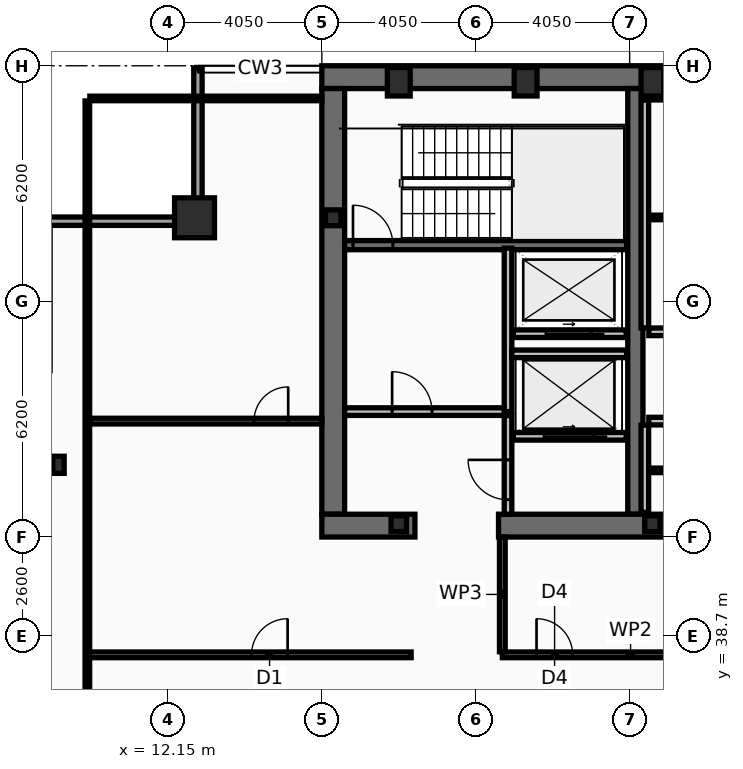
"""IFC4 building model, lengths in metres.
Left out: names, types, materials, properties, quantities, classifications, styles, units other than length and angle.
Written with IfcOpenShell. Run it as: python <this file> out.ifc"""

import sys

from ifc_helpers import new_model, si_unit, direction, frame, frame_2d, origin, origin_2d, place, context, subcontext, project, spatial, rectangle, hollow_rectangle, i_section, extrude, element, fill, save


model = new_model("IFC4")
c1 = context("Model", 3, precision=1e-05, world=origin(), true_north=direction((0.0, 1.0)))
c2 = subcontext(c1, "Body", "Model", "MODEL_VIEW")
j1 = project(units=[si_unit("LENGTHUNIT", "METRE"), si_unit("PLANEANGLEUNIT", "RADIAN")], contexts=[c1])
p1 = place(None, origin())
s1 = spatial("IfcSite", under=j1, at=p1, CompositionType="ELEMENT")
p2 = place(p1, origin())
s2 = spatial("IfcBuilding", under=s1, at=p2, CompositionType="ELEMENT")
p3 = place(p2, frame((0.0, 0.0, 242.6)))
s3 = spatial("IfcBuildingStorey", under=s2, at=p3, CompositionType="ELEMENT", Elevation=242.6)
p4 = place(p3, frame((16.2, 53.4, 0.0), z_axis=(0.0, 0.0, 1.0), x_axis=(1.0, 0.0, 0.0)))
e1 = element("IfcWall", 1, at=p4, inside=s3, PredefinedType="SHEAR", context=c2, shape_type="SweptSolid", body=[
    extrude(rectangle(XDim=40.5, YDim=0.6, at=frame_2d((20.25, 0.0))), origin(), (0.0, 0.0, 1.0), 3.44),
])
p5 = place(p3, frame((16.5, 41.9, 0.0), z_axis=(0.0, 0.0, 1.0), x_axis=(0.0, 1.0, 0.0)))
e2 = element("IfcWall", 2, at=p5, inside=s3, PredefinedType="SHEAR", context=c2, shape_type="SweptSolid", body=[
    extrude(rectangle(XDim=11.2, YDim=0.6, at=frame_2d((5.6, 0.0))), origin(), (0.0, 0.0, 1.0), 3.44),
])
p6 = place(p3, frame((24.45, 41.9, 0.0), z_axis=(0.0, 0.0, 1.0), x_axis=(0.0, 1.0, 0.0)))
e3 = element("IfcWall", 3, at=p6, inside=s3, PredefinedType="SHEAR", context=c2, shape_type="SweptSolid", body=[
    extrude(rectangle(XDim=11.2, YDim=0.4, at=frame_2d((5.6, 0.0))), origin(), (0.0, 0.0, 1.0), 3.44),
])
p7 = place(p3, frame((18.65, 41.6, 0.0), z_axis=(0.0, 0.0, 1.0), x_axis=(-1.0, 0.0, 0.0)))
e4 = element("IfcWall", 4, at=p7, inside=s3, PredefinedType="SHEAR", context=c2, shape_type="SweptSolid", body=[
    extrude(rectangle(XDim=2.45, YDim=0.6, at=frame_2d((1.225, 0.0))), origin(), (0.0, 0.0, 1.0), 3.44),
])
p8 = place(p3, frame((32.3, 41.6, 0.0), z_axis=(0.0, 0.0, 1.0), x_axis=(-1.0, 0.0, 0.0)))
e5 = element("IfcWall", 5, at=p8, inside=s3, PredefinedType="SHEAR", context=c2, shape_type="SweptSolid", body=[
    extrude(rectangle(XDim=11.45, YDim=0.6, at=frame_2d((5.725, 0.0))), origin(), (0.0, 0.0, 1.0), 3.44),
])
p9 = place(p3, frame((16.8, 48.98, 0.0), z_axis=(0.0, 0.0, 1.0), x_axis=(1.0, 0.0, 0.0)))
e6 = element("IfcWall", 6, at=p9, inside=s3, PredefinedType="SHEAR", context=c2, shape_type="SweptSolid", body=[
    extrude(rectangle(XDim=7.42, YDim=0.24, at=frame_2d((3.71, 0.0))), origin(), (0.0, 0.0, 1.0), 3.44),
])
p10 = place(p9, frame((0.22, 0.0, 0.0)))
e7 = element("IfcOpeningElement", 7, at=p10, cuts=e6, PredefinedType="OPENING", context=c2, shape_type="SweptSolid", body=[
    extrude(rectangle(XDim=1.05, YDim=2.15, at=frame_2d((0.525, 1.075))), frame((0.0, 0.13, 0.0), z_axis=(0.0, -1.0, 0.0), x_axis=(1.0, 0.0, 0.0)), (0.0, 0.0, 1.0), 0.26),
])
p11 = place(p3, frame((12.85, 49.7, 0.0), z_axis=(0.0, 0.0, 1.0), x_axis=(1.0, 0.0, 0.0)))
e8 = element("IfcColumn", 8, at=p11, inside=s3, PredefinedType="COLUMN", context=c2, shape_type="SweptSolid", body=[
    extrude(hollow_rectangle(XDim=1.05, YDim=1.05, WallThickness=0.055, at=origin_2d()), origin(), (0.0, 0.0, 1.0), 3.6),
])
for number, where, z_axis, x_axis in (
    (9, (18.225, 53.28, 0.0), (0.0, 0.0, 1.0), (1.0, 0.0, 0.0)),
    (10, (21.562, 53.28, 0.0), (0.0, 0.0, 1.0), (1.0, 0.0, 0.0)),
    (11, (24.9, 53.28, 0.0), (0.0, 0.0, 1.0), (1.0, 0.0, 0.0)),
):
    element("IfcColumn", number, at=place(p3, frame(where, z_axis=z_axis, x_axis=x_axis)), inside=s3, PredefinedType="COLUMN", context=c2, shape_type="SweptSolid", body=[
        extrude(hollow_rectangle(XDim=0.6, YDim=0.75, WallThickness=0.045, at=origin_2d()), origin(), (0.0, 0.0, 1.0), 3.6),
    ])
p12 = place(p3, frame((9.27, 43.2, 0.0), z_axis=(0.0, 0.0, 1.0), x_axis=(1.0, 0.0, 0.0)))
e12 = element("IfcColumn", 12, at=p12, inside=s3, PredefinedType="COLUMN", context=c2, shape_type="SweptSolid", body=[
    extrude(i_section(OverallWidth=0.3, OverallDepth=0.45, WebThickness=0.014, FlangeThickness=0.026, at=origin_2d()), origin(), (0.0, 0.0, 1.0), 3.6),
])
for number, where, z_axis, x_axis in (
    (13, (16.5, 49.7, 0.0), (0.0, 0.0, 1.0), (1.0, 0.0, 0.0)),
    (14, (18.225, 41.65, 0.0), (0.0, 0.0, 1.0), (1.0, 0.0, 0.0)),
    (15, (24.9, 41.65, 0.0), (0.0, 0.0, 1.0), (1.0, 0.0, 0.0)),
):
    element("IfcColumn", number, at=place(p3, frame(where, z_axis=z_axis, x_axis=x_axis)), inside=s3, PredefinedType="COLUMN", context=c2, shape_type="SweptSolid", body=[
        extrude(i_section(OverallWidth=0.406, OverallDepth=0.416, WebThickness=0.03, FlangeThickness=0.048, at=origin_2d()), origin(), (0.0, 0.0, 1.0), 3.6),
    ])
p13 = place(p3, frame((8.83, 49.61, 0.0), z_axis=(0.0, 0.0, 1.0), x_axis=(1.0, 0.0, 0.0)))
e16 = element("IfcWall", 16, at=p13, inside=s3, PredefinedType="SOLIDWALL", context=c2, shape_type="SweptSolid", body=[
    extrude(rectangle(XDim=4.22, YDim=0.22, at=frame_2d((2.11, 0.0))), origin(), (0.0, 0.0, 1.0), 2.83),
])
p14 = place(p3, frame((12.94, 49.72, 0.0), z_axis=(0.0, 0.0, 1.0), x_axis=(0.0, 1.0, 0.0)))
e17 = element("IfcWall", 17, at=p14, inside=s3, PredefinedType="SOLIDWALL", context=c2, shape_type="SweptSolid", body=[
    extrude(rectangle(XDim=3.91, YDim=0.22, at=frame_2d((1.955, 0.0))), origin(), (0.0, 0.0, 1.0), 2.83),
])
p15 = place(p3, frame((24.21, 43.95, 0.0), z_axis=(0.0, 0.0, 1.0), x_axis=(-1.0, 0.0, 0.0)))
e18 = element("IfcWall", 18, at=p15, inside=s3, PredefinedType="PARTITIONING", context=c2, shape_type="SweptSolid", body=[
    extrude(rectangle(XDim=2.97, YDim=0.2, at=frame_2d((1.485, 0.0))), origin(), (0.0, 0.0, 1.0), 3.44),
])
p16 = place(p15, frame((0.86, 0.0, 0.0)))
e19 = element("IfcOpeningElement", 19, at=p16, cuts=e18, PredefinedType="OPENING", context=c2, shape_type="SweptSolid", body=[
    extrude(rectangle(XDim=1.3, YDim=2.18, at=frame_2d((0.65, 1.09))), frame((0.0, 0.11, 0.0), z_axis=(0.0, -1.0, 0.0), x_axis=(1.0, 0.0, 0.0)), (0.0, 0.0, 1.0), 0.22),
])
p17 = place(p3, frame((24.21, 46.65, 0.0), z_axis=(0.0, 0.0, 1.0), x_axis=(-1.0, 0.0, 0.0)))
e20 = element("IfcWall", 20, at=p17, inside=s3, PredefinedType="PARTITIONING", context=c2, shape_type="SweptSolid", body=[
    extrude(rectangle(XDim=2.97, YDim=0.2, at=frame_2d((1.485, 0.0))), origin(), (0.0, 0.0, 1.0), 3.44),
])
p18 = place(p17, frame((0.91, 0.0, 0.0)))
e21 = element("IfcOpeningElement", 21, at=p18, cuts=e20, PredefinedType="OPENING", context=c2, shape_type="SweptSolid", body=[
    extrude(rectangle(XDim=1.2, YDim=2.18, at=frame_2d((0.6, 1.09))), frame((0.0, 0.11, 0.0), z_axis=(0.0, -1.0, 0.0), x_axis=(1.0, 0.0, 0.0)), (0.0, 0.0, 1.0), 0.22),
])
p19 = place(p3, frame((21.1, 44.6, 0.0), z_axis=(0.0, 0.0, 1.0), x_axis=(0.0, 1.0, 0.0)))
e22 = element("IfcWall", 22, at=p19, inside=s3, PredefinedType="PARTITIONING", context=c2, shape_type="SweptSolid", body=[
    extrude(rectangle(XDim=4.3, YDim=0.2, at=frame_2d((2.15, 0.0))), origin(), (0.0, 0.0, 1.0), 3.44),
])
p20 = place(p3, frame((16.8, 44.6, 0.0), z_axis=(0.0, 0.0, 1.0), x_axis=(1.0, 0.0, 0.0)))
e23 = element("IfcWall", 23, at=p20, inside=s3, PredefinedType="PARTITIONING", context=c2, shape_type="SweptSolid", body=[
    extrude(rectangle(XDim=4.2, YDim=0.2, at=frame_2d((2.1, 0.0))), origin(), (0.0, 0.0, 1.0), 3.44),
])
p21 = place(p20, frame((1.25, 0.0, 0.0)))
e24 = element("IfcOpeningElement", 24, at=p21, cuts=e23, PredefinedType="OPENING", context=c2, shape_type="SweptSolid", body=[
    extrude(rectangle(XDim=1.05, YDim=2.15, at=frame_2d((0.525, 1.075))), frame((0.0, 0.11, 0.0), z_axis=(0.0, -1.0, 0.0), x_axis=(1.0, 0.0, 0.0)), (0.0, 0.0, 1.0), 0.22),
])
p22 = place(p3, frame((21.2, 46.12, 0.0), z_axis=(0.0, 0.0, 1.0), x_axis=(1.0, 0.0, 0.0)))
e25 = element("IfcWall", 25, at=p22, inside=s3, PredefinedType="PARTITIONING", context=c2, shape_type="SweptSolid", body=[
    extrude(rectangle(XDim=3.02, YDim=0.2, at=frame_2d((1.51, 0.0))), origin(), (0.0, 0.0, 1.0), 3.44),
])
p23 = place(p3, frame((21.1, 41.9, 0.0), z_axis=(0.0, 0.0, 1.0), x_axis=(0.0, 1.0, 0.0)))
e26 = element("IfcWall", 26, at=p23, inside=s3, PredefinedType="PARTITIONING", context=c2, shape_type="SweptSolid", body=[
    extrude(rectangle(XDim=2.595, YDim=0.2, at=frame_2d((1.298, 0.0))), origin(), (0.0, 0.0, 1.0), 3.44),
])
p24 = place(p23, frame((0.38, 0.0, 0.0)))
e27 = element("IfcOpeningElement", 27, at=p24, cuts=e26, PredefinedType="OPENING", context=c2, shape_type="SweptSolid", body=[
    extrude(rectangle(XDim=1.05, YDim=2.15, at=frame_2d((0.525, 1.075))), frame((0.0, 0.11, 0.0), z_axis=(0.0, -1.0, 0.0), x_axis=(1.0, 0.0, 0.0)), (0.0, 0.0, 1.0), 0.22),
])
p25 = place(p3, frame((24.7, 46.805, 0.0), z_axis=(0.0, 0.0, 1.0), x_axis=(0.0, 1.0, 0.0)))
e28 = element("IfcWall", 28, at=p25, inside=s3, PredefinedType="PARTITIONING", context=c2, shape_type="SweptSolid", body=[
    extrude(rectangle(XDim=5.99, YDim=0.2, at=frame_2d((2.995, 0.0))), origin(), (0.0, 0.0, 1.0), 3.44),
])
p26 = place(p3, frame((24.805, 52.86, 0.0), z_axis=(0.0, 0.0, 1.0), x_axis=(1.0, 0.0, 0.0)))
e29 = element("IfcWall", 29, at=p26, inside=s3, PredefinedType="PARTITIONING", context=c2, shape_type="SweptSolid", body=[
    extrude(rectangle(XDim=7.51, YDim=0.12, at=frame_2d((3.755, 0.0))), origin(), (0.0, 0.0, 1.0), 3.44),
])
p27 = place(p3, frame((24.805, 49.709, 0.0), z_axis=(0.0, 0.0, 1.0), x_axis=(1.0, 0.0, 0.0)))
e30 = element("IfcWall", 30, at=p27, inside=s3, PredefinedType="PARTITIONING", context=c2, shape_type="SweptSolid", body=[
    extrude(rectangle(XDim=7.51, YDim=0.12, at=frame_2d((3.755, 0.0))), origin(), (0.0, 0.0, 1.0), 3.44),
])
p28 = place(p27, frame((2.4, 0.0, 0.0)))
e31 = element("IfcOpeningElement", 31, at=p28, cuts=e30, PredefinedType="OPENING", context=c2, shape_type="SweptSolid", body=[
    extrude(rectangle(XDim=0.9, YDim=2.05, at=frame_2d((0.45, 1.025))), frame((0.0, 0.07, 0.0), z_axis=(0.0, -1.0, 0.0), x_axis=(1.0, 0.0, 0.0)), (0.0, 0.0, 1.0), 0.14),
])
p29 = place(p3, frame((24.805, 46.7, 0.0), z_axis=(0.0, 0.0, 1.0), x_axis=(1.0, 0.0, 0.0)))
e32 = element("IfcWall", 32, at=p29, inside=s3, PredefinedType="PARTITIONING", context=c2, shape_type="SweptSolid", body=[
    extrude(rectangle(XDim=7.51, YDim=0.2, at=frame_2d((3.755, 0.0))), origin(), (0.0, 0.0, 1.0), 3.44),
])
p30 = place(p29, frame((2.4, 0.0, 0.0)))
e33 = element("IfcOpeningElement", 33, at=p30, cuts=e32, PredefinedType="OPENING", context=c2, shape_type="SweptSolid", body=[
    extrude(rectangle(XDim=0.95, YDim=2.1, at=frame_2d((0.475, 1.05))), frame((0.0, 0.11, 0.0), z_axis=(0.0, -1.0, 0.0), x_axis=(1.0, 0.0, 0.0)), (0.0, 0.0, 1.0), 0.22),
])
p31 = place(p3, frame((24.7, 41.95, 0.0), z_axis=(0.0, 0.0, 1.0), x_axis=(0.0, 1.0, 0.0)))
e34 = element("IfcWall", 34, at=p31, inside=s3, PredefinedType="PARTITIONING", context=c2, shape_type="SweptSolid", body=[
    extrude(rectangle(XDim=2.295, YDim=0.2, at=frame_2d((1.147, 0.0))), origin(), (0.0, 0.0, 1.0), 3.44),
])
p32 = place(p3, frame((24.805, 43.054, 0.0), z_axis=(0.0, 0.0, 1.0), x_axis=(1.0, 0.0, 0.0)))
e35 = element("IfcWall", 35, at=p32, inside=s3, PredefinedType="PARTITIONING", context=c2, shape_type="SweptSolid", body=[
    extrude(rectangle(XDim=7.34, YDim=0.12, at=frame_2d((3.67, 0.0))), origin(), (0.0, 0.0, 1.0), 3.44),
])
p33 = place(p32, frame((2.4, 0.0, 0.0)))
e36 = element("IfcOpeningElement", 36, at=p33, cuts=e35, PredefinedType="OPENING", context=c2, shape_type="SweptSolid", body=[
    extrude(rectangle(XDim=0.9, YDim=2.05, at=frame_2d((0.45, 1.025))), frame((0.0, 0.07, 0.0), z_axis=(0.0, -1.0, 0.0), x_axis=(1.0, 0.0, 0.0)), (0.0, 0.0, 1.0), 0.14),
])
p34 = place(p3, frame((24.805, 44.35, 0.0), z_axis=(0.0, 0.0, 1.0), x_axis=(1.0, 0.0, 0.0)))
e37 = element("IfcWall", 37, at=p34, inside=s3, PredefinedType="PARTITIONING", context=c2, shape_type="SweptSolid", body=[
    extrude(rectangle(XDim=7.34, YDim=0.2, at=frame_2d((3.67, 0.0))), origin(), (0.0, 0.0, 1.0), 3.44),
])
p35 = place(p34, frame((2.4, 0.0, 0.0)))
e38 = element("IfcOpeningElement", 38, at=p35, cuts=e37, PredefinedType="OPENING", context=c2, shape_type="SweptSolid", body=[
    extrude(rectangle(XDim=0.95, YDim=2.1, at=frame_2d((0.475, 1.05))), frame((0.0, 0.11, 0.0), z_axis=(0.0, -1.0, 0.0), x_axis=(1.0, 0.0, 0.0)), (0.0, 0.0, 1.0), 0.22),
])
p36 = place(p3, frame((20.95, 38.2, 0.0), z_axis=(0.0, 0.0, 1.0), x_axis=(1.0, 0.0, 0.0)))
e39 = element("IfcWall", 39, at=p36, inside=s3, PredefinedType="PARTITIONING", context=c2, shape_type="SweptSolid", body=[
    extrude(rectangle(XDim=4.55, YDim=0.15, at=frame_2d((2.275, 0.0))), origin(), (0.0, 0.0, 1.0), 2.78),
])
p37 = place(p36, frame((0.9, 0.0, 0.0)))
e40 = element("IfcOpeningElement", 40, at=p37, cuts=e39, PredefinedType="OPENING", context=c2, shape_type="SweptSolid", body=[
    extrude(rectangle(XDim=0.95, YDim=2.05, at=frame_2d((0.475, 1.025))), frame((0.0, 0.085, 0.0), z_axis=(0.0, -1.0, 0.0), x_axis=(1.0, 0.0, 0.0)), (0.0, 0.0, 1.0), 0.17),
])
p38 = place(p3, frame((20.95, 38.28, 0.0), z_axis=(0.0, 0.0, 1.0), x_axis=(0.0, 1.0, 0.0)))
e41 = element("IfcWall", 41, at=p38, inside=s3, PredefinedType="PARTITIONING", context=c2, shape_type="SweptSolid", body=[
    extrude(rectangle(XDim=3.02, YDim=0.15, at=frame_2d((1.51, 0.0))), origin(), (0.0, 0.0, 1.0), 3.44),
])
p39 = place(p3, frame((10.03, 38.2, 0.0), z_axis=(0.0, 0.0, 1.0), x_axis=(1.0, 0.0, 0.0)))
e42 = element("IfcWall", 42, at=p39, inside=s3, PredefinedType="PARTITIONING", context=c2, shape_type="SweptSolid", body=[
    extrude(rectangle(XDim=8.52, YDim=0.15, at=frame_2d((4.26, 0.0))), origin(), (0.0, 0.0, 1.0), 2.78),
])
p40 = place(p39, frame((4.32, 0.0, 0.0)))
e43 = element("IfcOpeningElement", 43, at=p40, cuts=e42, PredefinedType="OPENING", context=c2, shape_type="SweptSolid", body=[
    extrude(rectangle(XDim=0.95, YDim=2.05, at=frame_2d((0.475, 1.025))), frame((0.0, 0.085, 0.0), z_axis=(0.0, -1.0, 0.0), x_axis=(1.0, 0.0, 0.0)), (0.0, 0.0, 1.0), 0.17),
])
p41 = place(p3, frame((10.095, 44.35, 0.0), z_axis=(0.0, 0.0, 1.0), x_axis=(1.0, 0.0, 0.0)))
e44 = element("IfcWall", 44, at=p41, inside=s3, PredefinedType="PARTITIONING", context=c2, shape_type="SweptSolid", body=[
    extrude(rectangle(XDim=6.105, YDim=0.15, at=frame_2d((3.052, 0.0))), origin(), (0.0, 0.0, 1.0), 2.83),
])
p42 = place(p41, frame((4.32, 0.0, 0.0)))
e45 = element("IfcOpeningElement", 45, at=p42, cuts=e44, PredefinedType="OPENING", context=c2, shape_type="SweptSolid", body=[
    extrude(rectangle(XDim=0.9, YDim=2.05, at=frame_2d((0.45, 1.025))), frame((0.0, 0.085, 0.0), z_axis=(0.0, -1.0, 0.0), x_axis=(1.0, 0.0, 0.0)), (0.0, 0.0, 1.0), 0.17),
])
p43 = place(p3, frame((10.03, 10.665, 0.0), z_axis=(0.0, 0.0, 1.0), x_axis=(0.0, 1.0, 0.0)))
e46 = element("IfcWall", 46, at=p43, inside=s3, PredefinedType="PARTITIONING", context=c2, shape_type="SweptSolid", body=[
    extrude(rectangle(XDim=42.11, YDim=0.12, at=frame_2d((21.055, 0.0))), origin(), (0.0, 0.0, 1.0), 2.78),
])
p44 = place(p3, frame((10.095, 52.84, 0.0), z_axis=(0.0, 0.0, 1.0), x_axis=(1.0, 0.0, 0.0)))
e47 = element("IfcWall", 47, at=p44, inside=s3, PredefinedType="PARTITIONING", context=c2, shape_type="SweptSolid", body=[
    extrude(rectangle(XDim=6.105, YDim=0.12, at=frame_2d((3.052, 0.0))), origin(), (0.0, 0.0, 1.0), 3.44),
])
p45 = place(p10, origin())
e48 = element("IfcDoor", 48, at=p45, inside=s3, OperationType="SINGLE_SWING_LEFT", PredefinedType="DOOR", context=c2, shape_type="SweptSolid", body=[
    extrude(rectangle(XDim=1.05, YDim=2.15, at=frame_2d((0.525, 1.075))), frame((0.0, 0.025, 0.0), z_axis=(0.0, -1.0, 0.0), x_axis=(1.0, 0.0, 0.0)), (0.0, 0.0, 1.0), 0.05),
])
fill(e7, e48)
p46 = place(p16, origin())
e49 = element("IfcDoor", 49, at=p46, inside=s3, OperationType="SLIDING_TO_LEFT", PredefinedType="DOOR", context=c2, shape_type="SweptSolid", body=[
    extrude(rectangle(XDim=1.3, YDim=2.18, at=frame_2d((0.65, 1.09))), frame((0.0, 0.025, 0.0), z_axis=(0.0, -1.0, 0.0), x_axis=(1.0, 0.0, 0.0)), (0.0, 0.0, 1.0), 0.05),
])
fill(e19, e49)
p47 = place(p18, origin())
e50 = element("IfcDoor", 50, at=p47, inside=s3, OperationType="SLIDING_TO_LEFT", PredefinedType="DOOR", context=c2, shape_type="SweptSolid", body=[
    extrude(rectangle(XDim=1.2, YDim=2.18, at=frame_2d((0.6, 1.09))), frame((0.0, 0.025, 0.0), z_axis=(0.0, -1.0, 0.0), x_axis=(1.0, 0.0, 0.0)), (0.0, 0.0, 1.0), 0.05),
])
fill(e21, e50)
p48 = place(p21, origin())
e51 = element("IfcDoor", 51, at=p48, inside=s3, OperationType="SINGLE_SWING_LEFT", PredefinedType="DOOR", context=c2, shape_type="SweptSolid", body=[
    extrude(rectangle(XDim=1.05, YDim=2.15, at=frame_2d((0.525, 1.075))), frame((0.0, 0.025, 0.0), z_axis=(0.0, -1.0, 0.0), x_axis=(1.0, 0.0, 0.0)), (0.0, 0.0, 1.0), 0.05),
])
fill(e24, e51)
p49 = place(p24, origin())
e52 = element("IfcDoor", 52, at=p49, inside=s3, OperationType="SINGLE_SWING_RIGHT", PredefinedType="DOOR", context=c2, shape_type="SweptSolid", body=[
    extrude(rectangle(XDim=1.05, YDim=2.15, at=frame_2d((0.525, 1.075))), frame((0.0, 0.025, 0.0), z_axis=(0.0, -1.0, 0.0), x_axis=(1.0, 0.0, 0.0)), (0.0, 0.0, 1.0), 0.05),
])
fill(e27, e52)
p50 = place(p37, origin())
e53 = element("IfcDoor", 53, at=p50, inside=s3, OperationType="SINGLE_SWING_LEFT", PredefinedType="DOOR", context=c2, shape_type="SweptSolid", body=[
    extrude(rectangle(XDim=0.95, YDim=2.05, at=frame_2d((0.475, 1.025))), frame((0.0, 0.025, 0.0), z_axis=(0.0, -1.0, 0.0), x_axis=(1.0, 0.0, 0.0)), (0.0, 0.0, 1.0), 0.05),
])
fill(e40, e53)
p51 = place(p40, origin())
e54 = element("IfcDoor", 54, at=p51, inside=s3, OperationType="SINGLE_SWING_RIGHT", PredefinedType="DOOR", context=c2, shape_type="SweptSolid", body=[
    extrude(rectangle(XDim=0.95, YDim=2.05, at=frame_2d((0.475, 1.025))), frame((0.0, 0.025, 0.0), z_axis=(0.0, -1.0, 0.0), x_axis=(1.0, 0.0, 0.0)), (0.0, 0.0, 1.0), 0.05),
])
fill(e43, e54)
p52 = place(p42, origin())
e55 = element("IfcDoor", 55, at=p52, inside=s3, OperationType="SINGLE_SWING_RIGHT", PredefinedType="DOOR", context=c2, shape_type="SweptSolid", body=[
    extrude(rectangle(XDim=0.9, YDim=2.05, at=frame_2d((0.45, 1.025))), frame((0.0, 0.025, 0.0), z_axis=(0.0, -1.0, 0.0), x_axis=(1.0, 0.0, 0.0)), (0.0, 0.0, 1.0), 0.05),
])
fill(e45, e55)
save(model, sys.argv[1])
